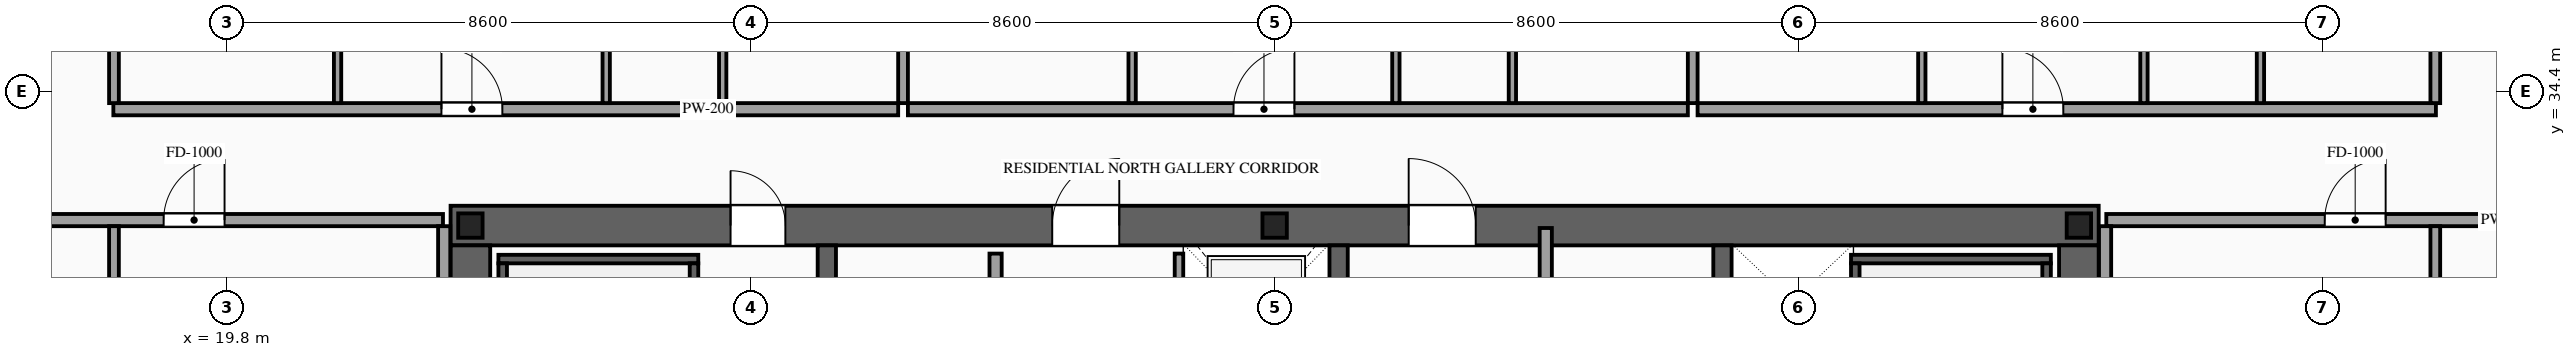
"""IFC4 building model, lengths in metres.
Left out: names, types, materials, properties, quantities, classifications, styles, units other than length and angle.
Written with IfcOpenShell. Run it as: python <this file> out.ifc"""

import sys

from ifc_helpers import new_model, si_unit, direction, frame, frame_2d, origin, origin_2d, place, context, subcontext, project, spatial, rectangle, i_section, extrude, source, transform, mapped, element, fill, save


model = new_model("IFC4")
c1 = context("Model", 3, precision=1e-05, world=origin(), true_north=direction((0.0, 1.0)))
c2 = subcontext(c1, "Body", "Model", "MODEL_VIEW")
j1 = project(units=[si_unit("LENGTHUNIT", "METRE"), si_unit("PLANEANGLEUNIT", "RADIAN")], contexts=[c1])
p1 = place(None, origin())
s1 = spatial("IfcSite", under=j1, at=p1, CompositionType="ELEMENT")
p2 = place(p1, origin())
s2 = spatial("IfcBuilding", under=s1, at=p2, CompositionType="ELEMENT")
p3 = place(p2, frame((0.0, 0.0, 209.0)))
s3 = spatial("IfcBuildingStorey", under=s2, at=p3, CompositionType="ELEMENT", Elevation=209.0)
p4 = place(p3, frame((23.475, 32.2, 0.0), z_axis=(0.0, 0.0, 1.0), x_axis=(1.0, 0.0, 0.0)))
e1 = element("IfcWall", 1, at=p4, inside=s3, PredefinedType="SHEAR", context=c2, shape_type="SweptSolid", body=[
    extrude(rectangle(XDim=27.05, YDim=0.65, at=frame_2d((13.525, 0.0))), origin(), (0.0, 0.0, 1.0), 3.5),
])
p5 = place(p4, frame((4.595, 0.0, 0.0)))
e2 = element("IfcOpeningElement", 2, at=p5, cuts=e1, PredefinedType="OPENING", context=c2, shape_type="SweptSolid", body=[
    extrude(rectangle(XDim=0.9, YDim=2.15, at=frame_2d((0.45, 1.075))), frame((0.0, 0.34, 0.0), z_axis=(0.0, -1.0, 0.0), x_axis=(1.0, 0.0, 0.0)), (0.0, 0.0, 1.0), 0.68),
])
p6 = place(p4, frame((9.875, 0.0, 0.0)))
e3 = element("IfcOpeningElement", 3, at=p6, cuts=e1, PredefinedType="OPENING", context=c2, shape_type="SweptSolid", body=[
    extrude(rectangle(XDim=1.1, YDim=2.2, at=frame_2d((0.55, 1.1))), frame((0.0, 0.34, 0.0), z_axis=(0.0, -1.0, 0.0), x_axis=(1.0, 0.0, 0.0)), (0.0, 0.0, 1.0), 0.68),
])
p7 = place(p4, frame((15.725, 0.0, 0.0)))
e4 = element("IfcOpeningElement", 4, at=p7, cuts=e1, PredefinedType="OPENING", context=c2, shape_type="SweptSolid", body=[
    extrude(rectangle(XDim=1.1, YDim=2.2, at=frame_2d((0.55, 1.1))), frame((0.0, 0.34, 0.0), z_axis=(0.0, -1.0, 0.0), x_axis=(1.0, 0.0, 0.0)), (0.0, 0.0, 1.0), 0.68),
])
m1 = source(origin(), c2, "Body", "SweptSolid", [
    extrude(rectangle(XDim=12.15, YDim=0.65, at=frame_2d((6.075, 0.0))), origin(), (0.0, 0.0, 1.0), 3.5),
])
for number, where, z_axis, x_axis in (
    (5, (23.8, 19.725, 0.0), (0.0, 0.0, 1.0), (0.0, 1.0, 0.0)),
    (6, (50.2, 19.725, 0.0), (0.0, 0.0, 1.0), (0.0, 1.0, 0.0)),
):
    element("IfcWall", number, at=place(p3, frame(where, z_axis=z_axis, x_axis=x_axis)), inside=s3, PredefinedType="SHEAR", context=c2, shape_type="MappedRepresentation", body=[
        mapped(m1, transform((0.0, 0.0, 0.0), scale=1.0)),
    ])
m2 = source(origin(), c2, "Body", "SweptSolid", [
    extrude(rectangle(XDim=12.15, YDim=0.3, at=frame_2d((6.075, 0.0))), origin(), (0.0, 0.0, 1.0), 3.5),
])
for number, where, z_axis, x_axis in (
    (7, (29.65, 19.725, 0.0), (0.0, 0.0, 1.0), (0.0, 1.0, 0.0)),
    (8, (38.05, 19.725, 0.0), (0.0, 0.0, 1.0), (0.0, 1.0, 0.0)),
    (9, (44.35, 19.725, 0.0), (0.0, 0.0, 1.0), (0.0, 1.0, 0.0)),
):
    element("IfcWall", number, at=place(p3, frame(where, z_axis=z_axis, x_axis=x_axis)), inside=s3, PredefinedType="SOLIDWALL", context=c2, shape_type="MappedRepresentation", body=[
        mapped(m2, transform((0.0, 0.0, 0.0), scale=1.0)),
    ])
m3 = source(origin(), c2, "Body", "SweptSolid", [
    extrude(i_section(OverallWidth=0.4, OverallDepth=0.4, WebThickness=0.013, FlangeThickness=0.021, at=origin_2d()), origin(), (0.0, 0.0, 1.0), 3.5),
])
for number, where, z_axis, x_axis in (
    (10, (23.8, 32.2, 0.0), (0.0, 0.0, 1.0), (1.0, 0.0, 0.0)),
    (11, (37.0, 32.2, 0.0), (0.0, 0.0, 1.0), (1.0, 0.0, 0.0)),
    (12, (50.2, 32.2, 0.0), (0.0, 0.0, 1.0), (1.0, 0.0, 0.0)),
):
    element("IfcColumn", number, at=place(p3, frame(where, z_axis=z_axis, x_axis=x_axis)), inside=s3, PredefinedType="COLUMN", context=c2, shape_type="MappedRepresentation", body=[
        mapped(m3, transform((0.0, 0.0, 0.0), scale=1.0)),
    ])
p8 = place(p3, frame((35.43, 29.4, 0.0), z_axis=(0.0, 0.0, 1.0), x_axis=(0.0, 1.0, 0.0)))
e13 = element("IfcWall", 13, at=p8, inside=s3, PredefinedType="SOLIDWALL", context=c2, shape_type="SweptSolid", body=[
    extrude(rectangle(XDim=2.34, YDim=0.14, at=frame_2d((1.17, 0.0))), origin(), (0.0, 0.0, 1.0), 3.28),
])
p9 = place(p8, frame((0.62, 0.0, 0.0)))
e14 = element("IfcOpeningElement", 14, at=p9, cuts=e13, PredefinedType="OPENING", context=c2, shape_type="SweptSolid", body=[
    extrude(rectangle(XDim=1.1, YDim=2.2, at=frame_2d((0.55, 1.1))), frame((0.0, 0.085, 0.0), z_axis=(0.0, -1.0, 0.0), x_axis=(1.0, 0.0, 0.0)), (0.0, 0.0, 1.0), 0.17),
])
m4 = source(origin(), c2, "Body", "SweptSolid", [
    extrude(rectangle(XDim=3.28, YDim=0.14, at=frame_2d((1.64, 0.0))), origin(), (0.0, 0.0, 1.0), 3.28),
])
p10 = place(p3, frame((24.26, 31.65, 0.0), z_axis=(0.0, 0.0, 1.0), x_axis=(1.0, 0.0, 0.0)))
e15 = element("IfcWall", 15, at=p10, inside=s3, PredefinedType="SOLIDWALL", context=c2, shape_type="MappedRepresentation", body=[
    mapped(m4, transform((0.0, 0.0, 0.0), scale=1.0)),
])
m5 = source(origin(), c2, "Body", "SweptSolid", [
    extrude(rectangle(XDim=8.94, YDim=0.14, at=frame_2d((4.47, 0.0))), origin(), (0.0, 0.0, 1.0), 3.28),
])
for number, where, z_axis, x_axis in (
    (16, (24.33, 22.64, 0.0), (0.0, 0.0, 1.0), (0.0, 1.0, 0.0)),
    (17, (27.47, 22.64, 0.0), (0.0, 0.0, 1.0), (0.0, 1.0, 0.0)),
):
    element("IfcWall", number, at=place(p3, frame(where, z_axis=z_axis, x_axis=x_axis)), inside=s3, PredefinedType="SOLIDWALL", context=c2, shape_type="MappedRepresentation", body=[
        mapped(m5, transform((0.0, 0.0, 0.0), scale=1.0)),
    ])
p11 = place(p3, frame((46.46, 31.65, 0.0), z_axis=(0.0, 0.0, 1.0), x_axis=(1.0, 0.0, 0.0)))
e18 = element("IfcWall", 18, at=p11, inside=s3, PredefinedType="SOLIDWALL", context=c2, shape_type="MappedRepresentation", body=[
    mapped(m4, transform((0.0, 0.0, 0.0), scale=1.0)),
])
for number, where, z_axis, x_axis in (
    (19, (46.53, 22.64, 0.0), (0.0, 0.0, 1.0), (0.0, 1.0, 0.0)),
    (20, (49.67, 22.64, 0.0), (0.0, 0.0, 1.0), (0.0, 1.0, 0.0)),
):
    element("IfcWall", number, at=place(p3, frame(where, z_axis=z_axis, x_axis=x_axis)), inside=s3, PredefinedType="SOLIDWALL", context=c2, shape_type="MappedRepresentation", body=[
        mapped(m5, transform((0.0, 0.0, 0.0), scale=1.0)),
    ])
p12 = place(p3, frame((32.42, 19.86, 0.0), z_axis=(0.0, 0.0, 1.0), x_axis=(0.0, 1.0, 0.0)))
e21 = element("IfcWall", 21, at=p12, inside=s3, PredefinedType="PARTITIONING", context=c2, shape_type="SweptSolid", body=[
    extrude(rectangle(XDim=11.88, YDim=0.2, at=frame_2d((5.94, 0.0))), origin(), (0.0, 0.0, 1.0), 3.28),
])
p13 = place(p12, frame((5.49, 0.0, 0.0)))
e22 = element("IfcOpeningElement", 22, at=p13, cuts=e21, PredefinedType="OPENING", context=c2, shape_type="SweptSolid", body=[
    extrude(rectangle(XDim=0.9, YDim=2.15, at=frame_2d((0.45, 1.075))), frame((0.0, 0.115, 0.0), z_axis=(0.0, -1.0, 0.0), x_axis=(1.0, 0.0, 0.0)), (0.0, 0.0, 1.0), 0.23),
])
m6 = source(origin(), c2, "Body", "SweptSolid", [
    extrude(rectangle(XDim=12.72, YDim=0.2, at=frame_2d((6.36, 0.0))), origin(), (0.0, 0.0, 1.0), 3.28),
])
p14 = place(p3, frame((41.45, 19.44, 0.0), z_axis=(0.0, 0.0, 1.0), x_axis=(0.0, 1.0, 0.0)))
e23 = element("IfcWall", 23, at=p14, inside=s3, PredefinedType="PARTITIONING", context=c2, shape_type="MappedRepresentation", body=[
    mapped(m6, transform((0.0, 0.0, 0.0), scale=1.0)),
])
p15 = place(p3, frame((17.94, 34.11, 0.0), z_axis=(0.0, 0.0, 1.0), x_axis=(1.0, 0.0, 0.0)))
e24 = element("IfcWall", 24, at=p15, inside=s3, PredefinedType="PARTITIONING", context=c2, shape_type="SweptSolid", body=[
    extrude(rectangle(XDim=12.881, YDim=0.2, at=frame_2d((6.44, 0.0))), origin(), (0.0, 0.0, 1.0), 3.28),
])
p16 = place(p15, frame((5.385, 0.0, 0.0)))
e25 = element("IfcOpeningElement", 25, at=p16, cuts=e24, PredefinedType="OPENING", context=c2, shape_type="SweptSolid", body=[
    extrude(rectangle(XDim=1.0, YDim=2.2, at=frame_2d((0.5, 1.1))), frame((0.0, 0.115, 0.0), z_axis=(0.0, -1.0, 0.0), x_axis=(1.0, 0.0, 0.0)), (0.0, 0.0, 1.0), 0.23),
])
m7 = source(origin(), c2, "Body", "SweptSolid", [
    extrude(rectangle(XDim=13.54, YDim=0.16, at=frame_2d((6.77, 0.0))), origin(), (0.0, 0.0, 1.0), 3.28),
])
p17 = place(p3, frame((30.901, 34.21, 0.0), z_axis=(0.0, 0.0, 1.0), x_axis=(0.0, 1.0, 0.0)))
e26 = element("IfcWall", 26, at=p17, inside=s3, PredefinedType="PARTITIONING", context=c2, shape_type="MappedRepresentation", body=[
    mapped(m7, transform((0.0, 0.0, 0.0), scale=1.0)),
])
m8 = source(origin(), c2, "Body", "SweptSolid", [
    extrude(rectangle(XDim=5.61, YDim=0.12, at=frame_2d((2.805, 0.0))), origin(), (0.0, 0.0, 1.0), 3.28),
])
p18 = place(p3, frame((21.62, 34.21, 0.0), z_axis=(0.0, 0.0, 1.0), x_axis=(0.0, 1.0, 0.0)))
e27 = element("IfcWall", 27, at=p18, inside=s3, PredefinedType="PARTITIONING", context=c2, shape_type="MappedRepresentation", body=[
    mapped(m8, transform((0.0, 0.0, 0.0), scale=1.0)),
])
p19 = place(p3, frame((27.941, 34.21, 0.0), z_axis=(0.0, 0.0, 1.0), x_axis=(0.0, 1.0, 0.0)))
e28 = element("IfcWall", 28, at=p19, inside=s3, PredefinedType="PARTITIONING", context=c2, shape_type="SweptSolid", body=[
    extrude(rectangle(XDim=5.61, YDim=0.12, at=frame_2d((2.805, 0.0))), origin(), (0.0, 0.0, 1.0), 3.28),
])
p20 = place(p19, frame((2.38, 0.0, 0.0)))
e29 = element("IfcOpeningElement", 29, at=p20, cuts=e28, PredefinedType="OPENING", context=c2, shape_type="SweptSolid", body=[
    extrude(rectangle(XDim=0.85, YDim=2.1, at=frame_2d((0.425, 1.05))), frame((0.0, 0.075, 0.0), z_axis=(0.0, -1.0, 0.0), x_axis=(1.0, 0.0, 0.0)), (0.0, 0.0, 1.0), 0.15),
])
p21 = place(p3, frame((26.029, 34.21, 0.0), z_axis=(0.0, 0.0, 1.0), x_axis=(0.0, 1.0, 0.0)))
e30 = element("IfcWall", 30, at=p21, inside=s3, PredefinedType="PARTITIONING", context=c2, shape_type="SweptSolid", body=[
    extrude(rectangle(XDim=5.61, YDim=0.12, at=frame_2d((2.805, 0.0))), origin(), (0.0, 0.0, 1.0), 3.28),
])
p22 = place(p21, frame((2.38, 0.0, 0.0)))
e31 = element("IfcOpeningElement", 31, at=p22, cuts=e30, PredefinedType="OPENING", context=c2, shape_type="SweptSolid", body=[
    extrude(rectangle(XDim=0.85, YDim=2.1, at=frame_2d((0.425, 1.05))), frame((0.0, 0.075, 0.0), z_axis=(0.0, -1.0, 0.0), x_axis=(1.0, 0.0, 0.0)), (0.0, 0.0, 1.0), 0.15),
])
p23 = place(p3, frame((30.981, 34.11, 0.0), z_axis=(0.0, 0.0, 1.0), x_axis=(1.0, 0.0, 0.0)))
e32 = element("IfcWall", 32, at=p23, inside=s3, PredefinedType="PARTITIONING", context=c2, shape_type="SweptSolid", body=[
    extrude(rectangle(XDim=12.801, YDim=0.2, at=frame_2d((6.4, 0.0))), origin(), (0.0, 0.0, 1.0), 3.28),
])
p24 = place(p23, frame((5.344, 0.0, 0.0)))
e33 = element("IfcOpeningElement", 33, at=p24, cuts=e32, PredefinedType="OPENING", context=c2, shape_type="SweptSolid", body=[
    extrude(rectangle(XDim=1.0, YDim=2.2, at=frame_2d((0.5, 1.1))), frame((0.0, 0.115, 0.0), z_axis=(0.0, -1.0, 0.0), x_axis=(1.0, 0.0, 0.0)), (0.0, 0.0, 1.0), 0.23),
])
p25 = place(p3, frame((43.862, 34.21, 0.0), z_axis=(0.0, 0.0, 1.0), x_axis=(0.0, 1.0, 0.0)))
e34 = element("IfcWall", 34, at=p25, inside=s3, PredefinedType="PARTITIONING", context=c2, shape_type="MappedRepresentation", body=[
    mapped(m7, transform((0.0, 0.0, 0.0), scale=1.0)),
])
p26 = place(p3, frame((34.661, 34.21, 0.0), z_axis=(0.0, 0.0, 1.0), x_axis=(0.0, 1.0, 0.0)))
e35 = element("IfcWall", 35, at=p26, inside=s3, PredefinedType="PARTITIONING", context=c2, shape_type="MappedRepresentation", body=[
    mapped(m8, transform((0.0, 0.0, 0.0), scale=1.0)),
])
p27 = place(p3, frame((40.902, 34.21, 0.0), z_axis=(0.0, 0.0, 1.0), x_axis=(0.0, 1.0, 0.0)))
e36 = element("IfcWall", 36, at=p27, inside=s3, PredefinedType="PARTITIONING", context=c2, shape_type="SweptSolid", body=[
    extrude(rectangle(XDim=5.61, YDim=0.12, at=frame_2d((2.805, 0.0))), origin(), (0.0, 0.0, 1.0), 3.28),
])
p28 = place(p27, frame((2.38, 0.0, 0.0)))
e37 = element("IfcOpeningElement", 37, at=p28, cuts=e36, PredefinedType="OPENING", context=c2, shape_type="SweptSolid", body=[
    extrude(rectangle(XDim=0.85, YDim=2.1, at=frame_2d((0.425, 1.05))), frame((0.0, 0.075, 0.0), z_axis=(0.0, -1.0, 0.0), x_axis=(1.0, 0.0, 0.0)), (0.0, 0.0, 1.0), 0.15),
])
p29 = place(p3, frame((38.99, 34.21, 0.0), z_axis=(0.0, 0.0, 1.0), x_axis=(0.0, 1.0, 0.0)))
e38 = element("IfcWall", 38, at=p29, inside=s3, PredefinedType="PARTITIONING", context=c2, shape_type="SweptSolid", body=[
    extrude(rectangle(XDim=5.61, YDim=0.12, at=frame_2d((2.805, 0.0))), origin(), (0.0, 0.0, 1.0), 3.28),
])
p30 = place(p29, frame((2.38, 0.0, 0.0)))
e39 = element("IfcOpeningElement", 39, at=p30, cuts=e38, PredefinedType="OPENING", context=c2, shape_type="SweptSolid", body=[
    extrude(rectangle(XDim=0.85, YDim=2.1, at=frame_2d((0.425, 1.05))), frame((0.0, 0.075, 0.0), z_axis=(0.0, -1.0, 0.0), x_axis=(1.0, 0.0, 0.0)), (0.0, 0.0, 1.0), 0.15),
])
p31 = place(p3, frame((43.942, 34.11, 0.0), z_axis=(0.0, 0.0, 1.0), x_axis=(1.0, 0.0, 0.0)))
e40 = element("IfcWall", 40, at=p31, inside=s3, PredefinedType="PARTITIONING", context=c2, shape_type="SweptSolid", body=[
    extrude(rectangle(XDim=12.118, YDim=0.2, at=frame_2d((6.059, 0.0))), origin(), (0.0, 0.0, 1.0), 3.28),
])
p32 = place(p31, frame((5.003, 0.0, 0.0)))
e41 = element("IfcOpeningElement", 41, at=p32, cuts=e40, PredefinedType="OPENING", context=c2, shape_type="SweptSolid", body=[
    extrude(rectangle(XDim=1.0, YDim=2.2, at=frame_2d((0.5, 1.1))), frame((0.0, 0.115, 0.0), z_axis=(0.0, -1.0, 0.0), x_axis=(1.0, 0.0, 0.0)), (0.0, 0.0, 1.0), 0.23),
])
m9 = source(origin(), c2, "Body", "SweptSolid", [
    extrude(rectangle(XDim=13.39, YDim=0.16, at=frame_2d((6.695, 0.0))), origin(), (0.0, 0.0, 1.0), 3.28),
])
for number, where, z_axis, x_axis in (
    (42, (17.95, 34.21, 0.0), (0.0, 0.0, 1.0), (0.0, 1.0, 0.0)),
    (43, (56.05, 34.21, 0.0), (0.0, 0.0, 1.0), (0.0, 1.0, 0.0)),
):
    element("IfcWall", number, at=place(p3, frame(where, z_axis=z_axis, x_axis=x_axis)), inside=s3, PredefinedType="PARTITIONING", context=c2, shape_type="MappedRepresentation", body=[
        mapped(m9, transform((0.0, 0.0, 0.0), scale=1.0)),
    ])
p33 = place(p3, frame((47.622, 34.21, 0.0), z_axis=(0.0, 0.0, 1.0), x_axis=(0.0, 1.0, 0.0)))
e44 = element("IfcWall", 44, at=p33, inside=s3, PredefinedType="PARTITIONING", context=c2, shape_type="MappedRepresentation", body=[
    mapped(m8, transform((0.0, 0.0, 0.0), scale=1.0)),
])
p34 = place(p3, frame((53.18, 34.21, 0.0), z_axis=(0.0, 0.0, 1.0), x_axis=(0.0, 1.0, 0.0)))
e45 = element("IfcWall", 45, at=p34, inside=s3, PredefinedType="PARTITIONING", context=c2, shape_type="SweptSolid", body=[
    extrude(rectangle(XDim=5.61, YDim=0.12, at=frame_2d((2.805, 0.0))), origin(), (0.0, 0.0, 1.0), 3.28),
])
p35 = place(p34, frame((2.38, 0.0, 0.0)))
e46 = element("IfcOpeningElement", 46, at=p35, cuts=e45, PredefinedType="OPENING", context=c2, shape_type="SweptSolid", body=[
    extrude(rectangle(XDim=0.85, YDim=2.1, at=frame_2d((0.425, 1.05))), frame((0.0, 0.075, 0.0), z_axis=(0.0, -1.0, 0.0), x_axis=(1.0, 0.0, 0.0)), (0.0, 0.0, 1.0), 0.15),
])
p36 = place(p3, frame((51.268, 34.21, 0.0), z_axis=(0.0, 0.0, 1.0), x_axis=(0.0, 1.0, 0.0)))
e47 = element("IfcWall", 47, at=p36, inside=s3, PredefinedType="PARTITIONING", context=c2, shape_type="SweptSolid", body=[
    extrude(rectangle(XDim=5.61, YDim=0.12, at=frame_2d((2.805, 0.0))), origin(), (0.0, 0.0, 1.0), 3.28),
])
p37 = place(p36, frame((2.38, 0.0, 0.0)))
e48 = element("IfcOpeningElement", 48, at=p37, cuts=e47, PredefinedType="OPENING", context=c2, shape_type="SweptSolid", body=[
    extrude(rectangle(XDim=0.85, YDim=2.1, at=frame_2d((0.425, 1.05))), frame((0.0, 0.075, 0.0), z_axis=(0.0, -1.0, 0.0), x_axis=(1.0, 0.0, 0.0)), (0.0, 0.0, 1.0), 0.15),
])
p38 = place(p3, frame((15.05, 32.29, 0.0), z_axis=(0.0, 0.0, 1.0), x_axis=(1.0, 0.0, 0.0)))
e49 = element("IfcWall", 49, at=p38, inside=s3, PredefinedType="PARTITIONING", context=c2, shape_type="SweptSolid", body=[
    extrude(rectangle(XDim=8.3, YDim=0.2, at=frame_2d((4.15, 0.0))), origin(), (0.0, 0.0, 1.0), 2.775),
])
p39 = place(p38, frame((3.715, 0.0, 0.0)))
e50 = element("IfcOpeningElement", 50, at=p39, cuts=e49, PredefinedType="OPENING", context=c2, shape_type="SweptSolid", body=[
    extrude(rectangle(XDim=1.0, YDim=2.2, at=frame_2d((0.5, 1.1))), frame((0.0, 0.115, 0.0), z_axis=(0.0, -1.0, 0.0), x_axis=(1.0, 0.0, 0.0)), (0.0, 0.0, 1.0), 0.23),
])
m10 = source(origin(), c2, "Body", "SweptSolid", [
    extrude(rectangle(XDim=12.78, YDim=0.2, at=frame_2d((6.39, 0.0))), origin(), (0.0, 0.0, 1.0), 3.28),
])
p40 = place(p3, frame((23.37, 19.41, 0.0), z_axis=(0.0, 0.0, 1.0), x_axis=(0.0, 1.0, 0.0)))
e51 = element("IfcWall", 51, at=p40, inside=s3, PredefinedType="PARTITIONING", context=c2, shape_type="MappedRepresentation", body=[
    mapped(m10, transform((0.0, 0.0, 0.0), scale=1.0)),
])
p41 = place(p3, frame((50.65, 32.29, 0.0), z_axis=(0.0, 0.0, 1.0), x_axis=(1.0, 0.0, 0.0)))
e52 = element("IfcWall", 52, at=p41, inside=s3, PredefinedType="PARTITIONING", context=c2, shape_type="SweptSolid", body=[
    extrude(rectangle(XDim=8.3, YDim=0.2, at=frame_2d((4.15, 0.0))), origin(), (0.0, 0.0, 1.0), 2.775),
])
p42 = place(p41, frame((3.585, 0.0, 0.0)))
e53 = element("IfcOpeningElement", 53, at=p42, cuts=e52, PredefinedType="OPENING", context=c2, shape_type="SweptSolid", body=[
    extrude(rectangle(XDim=1.0, YDim=2.2, at=frame_2d((0.5, 1.1))), frame((0.0, 0.115, 0.0), z_axis=(0.0, -1.0, 0.0), x_axis=(1.0, 0.0, 0.0)), (0.0, 0.0, 1.0), 0.23),
])
m11 = source(origin(), c2, "Body", "SweptSolid", [
    extrude(rectangle(XDim=28.19, YDim=0.16, at=frame_2d((14.095, 0.0))), origin(), (0.0, 0.0, 1.0), 3.28),
])
for number, where, z_axis, x_axis in (
    (54, (17.95, 4.0, 0.0), (0.0, 0.0, 1.0), (0.0, 1.0, 0.0)),
    (55, (56.05, 4.0, 0.0), (0.0, 0.0, 1.0), (0.0, 1.0, 0.0)),
):
    element("IfcWall", number, at=place(p3, frame(where, z_axis=z_axis, x_axis=x_axis)), inside=s3, PredefinedType="PARTITIONING", context=c2, shape_type="MappedRepresentation", body=[
        mapped(m11, transform((0.0, 0.0, 0.0), scale=1.0)),
    ])
m12 = source(origin(), c2, "Body", "SweptSolid", [
    extrude(rectangle(XDim=6.29, YDim=0.2, at=frame_2d((3.145, 0.0))), origin(), (0.0, 0.0, 1.0), 3.28),
])
p43 = place(p3, frame((50.63, 25.9, 0.0), z_axis=(0.0, 0.0, 1.0), x_axis=(0.0, 1.0, 0.0)))
e56 = element("IfcWall", 56, at=p43, inside=s3, PredefinedType="PARTITIONING", context=c2, shape_type="MappedRepresentation", body=[
    mapped(m12, transform((0.0, 0.0, 0.0), scale=1.0)),
])
m13 = source(origin(), c2, "Body", "SweptSolid", [
    extrude(rectangle(XDim=0.9, YDim=2.15, at=frame_2d((0.45, 1.075))), frame((0.0, 0.025, 0.0), z_axis=(0.0, -1.0, 0.0), x_axis=(1.0, 0.0, 0.0)), (0.0, 0.0, 1.0), 0.05),
])
p44 = place(p5, origin())
e57 = element("IfcDoor", 57, at=p44, inside=s3, OperationType="SINGLE_SWING_LEFT", PredefinedType="DOOR", context=c2, shape_type="MappedRepresentation", body=[
    mapped(m13, transform((0.0, 0.0, 0.0), scale=1.0)),
])
fill(e2, e57)
m14 = source(origin(), c2, "Body", "SweptSolid", [
    extrude(rectangle(XDim=1.1, YDim=2.2, at=frame_2d((0.55, 1.1))), frame((0.0, 0.025, 0.0), z_axis=(0.0, -1.0, 0.0), x_axis=(1.0, 0.0, 0.0)), (0.0, 0.0, 1.0), 0.05),
])
p45 = place(p6, origin())
e58 = element("IfcDoor", 58, at=p45, inside=s3, OperationType="SINGLE_SWING_RIGHT", PredefinedType="DOOR", context=c2, shape_type="MappedRepresentation", body=[
    mapped(m14, transform((0.0, 0.0, 0.0), scale=1.0)),
])
fill(e3, e58)
p46 = place(p7, origin())
e59 = element("IfcDoor", 59, at=p46, inside=s3, OperationType="SINGLE_SWING_LEFT", PredefinedType="DOOR", context=c2, shape_type="MappedRepresentation", body=[
    mapped(m14, transform((0.0, 0.0, 0.0), scale=1.0)),
])
fill(e4, e59)
m15 = source(origin(), c2, "Body", "SweptSolid", [
    extrude(rectangle(XDim=1.0, YDim=2.2, at=frame_2d((0.5, 1.1))), frame((0.0, 0.025, 0.0), z_axis=(0.0, -1.0, 0.0), x_axis=(1.0, 0.0, 0.0)), (0.0, 0.0, 1.0), 0.05),
])
p47 = place(p16, origin())
e60 = element("IfcDoor", 60, at=p47, inside=s3, OperationType="SINGLE_SWING_LEFT", PredefinedType="DOOR", context=c2, shape_type="MappedRepresentation", body=[
    mapped(m15, transform((0.0, 0.0, 0.0), scale=1.0)),
])
fill(e25, e60)
p48 = place(p24, origin())
e61 = element("IfcDoor", 61, at=p48, inside=s3, OperationType="SINGLE_SWING_RIGHT", PredefinedType="DOOR", context=c2, shape_type="MappedRepresentation", body=[
    mapped(m15, transform((0.0, 0.0, 0.0), scale=1.0)),
])
fill(e33, e61)
p49 = place(p32, origin())
e62 = element("IfcDoor", 62, at=p49, inside=s3, OperationType="SINGLE_SWING_LEFT", PredefinedType="DOOR", context=c2, shape_type="MappedRepresentation", body=[
    mapped(m15, transform((0.0, 0.0, 0.0), scale=1.0)),
])
fill(e41, e62)
p50 = place(p39, origin())
e63 = element("IfcDoor", 63, at=p50, inside=s3, OperationType="SINGLE_SWING_RIGHT", PredefinedType="DOOR", context=c2, shape_type="MappedRepresentation", body=[
    mapped(m15, transform((0.0, 0.0, 0.0), scale=1.0)),
])
fill(e50, e63)
p51 = place(p42, origin())
e64 = element("IfcDoor", 64, at=p51, inside=s3, OperationType="SINGLE_SWING_RIGHT", PredefinedType="DOOR", context=c2, shape_type="MappedRepresentation", body=[
    mapped(m15, transform((0.0, 0.0, 0.0), scale=1.0)),
])
fill(e53, e64)
save(model, sys.argv[1])
